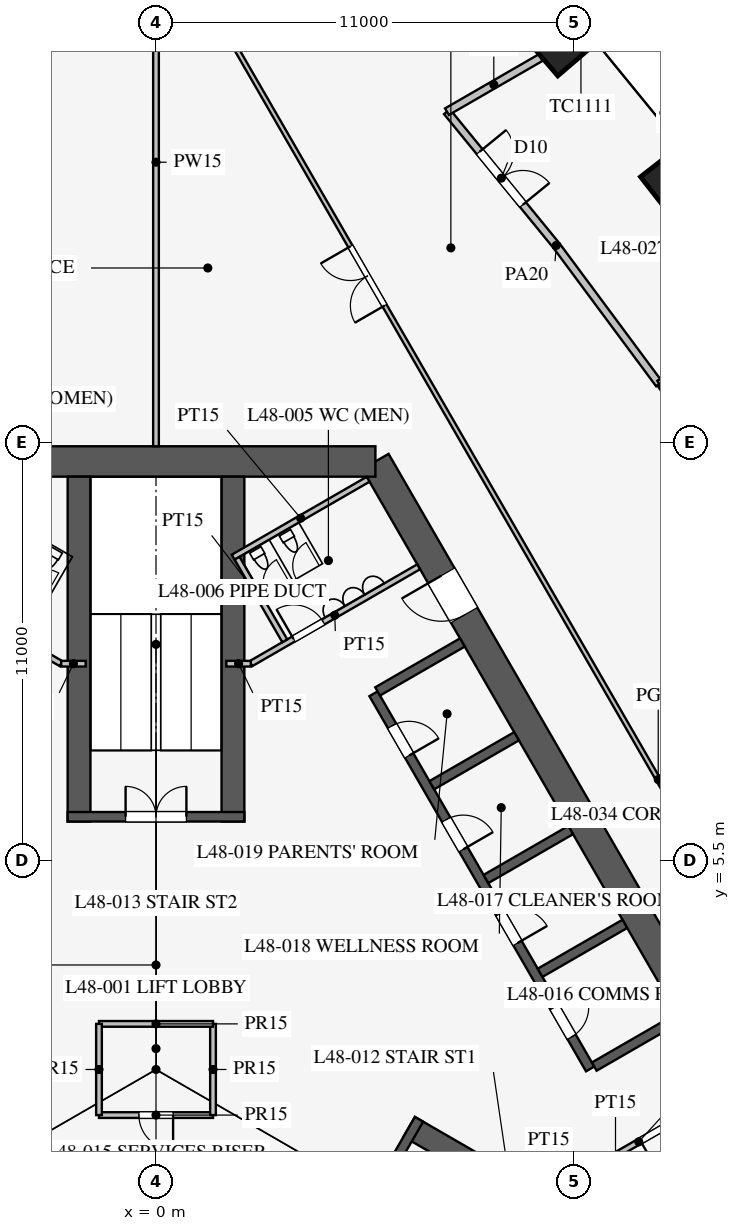
"""IFC4 building model, lengths in metres.
Left out: names, types, materials, properties, quantities, classifications, styles, units other than length and angle.
Written with IfcOpenShell. Run it as: python <this file> out.ifc"""

import sys

from ifc_helpers import new_model, si_unit, direction, frame, frame_2d, origin, origin_2d, place, context, subcontext, project, spatial, rectangle, extrude, element, fill, save


model = new_model("IFC4")
c1 = context("Model", 3, precision=1e-05, world=origin(), true_north=direction((0.0, 1.0)))
c2 = subcontext(c1, "Body", "Model", "MODEL_VIEW")
j1 = project(units=[si_unit("LENGTHUNIT", "METRE"), si_unit("PLANEANGLEUNIT", "RADIAN")], contexts=[c1])
p1 = place(None, origin())
s1 = spatial("IfcSite", under=j1, at=p1, CompositionType="ELEMENT")
p2 = place(p1, origin())
s2 = spatial("IfcBuilding", under=s1, at=p2, CompositionType="ELEMENT")
p3 = place(p2, frame((0.0, 0.0, 210.7)))
s3 = spatial("IfcBuildingStorey", under=s2, at=p3, CompositionType="ELEMENT", Elevation=210.7)
for number, where, z_axis, x_axis in (
    (1, (13.522, 23.396, 0.0), (0.0, 0.0, 1.0), (-0.615, 0.789, 0.0)),
    (2, (10.632, 26.923, 0.0), (0.0, 0.0, 1.0), (-0.651, 0.759, 0.0)),
):
    element("IfcColumn", number, at=place(p3, frame(where, z_axis=z_axis, x_axis=x_axis)), inside=s3, PredefinedType="COLUMN", context=c2, shape_type="SweptSolid", body=[
        extrude(rectangle(XDim=1.1, YDim=1.1, at=origin_2d()), origin(), (0.0, 0.0, 1.0), 4.2),
    ])
p4 = place(p3, frame((16.743, -3.0, 0.0), z_axis=(0.0, 0.0, 1.0), x_axis=(-0.500002442456, 0.866023993627, 0.0)))
e3 = element("IfcWall", 3, at=p4, inside=s3, PredefinedType="SHEAR", context=c2, shape_type="SweptSolid", body=[
    extrude(rectangle(XDim=21.939, YDim=0.8, at=frame_2d((10.97, 0.0))), origin(), (0.0, 0.0, 1.0), 4.2),
])
p5 = place(p4, frame((17.27, 0.0, 0.0)))
e4 = element("IfcOpeningElement", 4, at=p5, cuts=e3, PredefinedType="OPENING", context=c2, shape_type="SweptSolid", body=[
    extrude(rectangle(XDim=1.2, YDim=2.1, at=frame_2d((0.6, 1.05))), frame((0.0, 0.41, 0.0), z_axis=(0.0, -1.0, 0.0), x_axis=(1.0, 0.0, 0.0)), (0.0, 0.0, 1.0), 0.82),
])
p6 = place(p4, frame((3.47, 0.0, 0.0)))
e5 = element("IfcOpeningElement", 5, at=p6, cuts=e3, PredefinedType="OPENING", context=c2, shape_type="SweptSolid", body=[
    extrude(rectangle(XDim=1.2, YDim=2.1, at=frame_2d((0.6, 1.05))), frame((0.0, 0.41, 0.0), z_axis=(0.0, -1.0, 0.0), x_axis=(1.0, 0.0, 0.0)), (0.0, 0.0, 1.0), 0.82),
])
p7 = place(p3, frame((5.773, 16.0, 0.0), z_axis=(0.0, 0.0, 1.0), x_axis=(-1.0, 0.0, 0.0)))
e6 = element("IfcWall", 6, at=p7, inside=s3, PredefinedType="SHEAR", context=c2, shape_type="SweptSolid", body=[
    extrude(rectangle(XDim=11.547, YDim=0.8, at=frame_2d((5.773, 0.0))), origin(), (0.0, 0.0, 1.0), 4.2),
])
p8 = place(p3, frame((11.424, 0.014, 0.0), z_axis=(0.0, 0.0, 1.0), x_axis=(-0.500001763848, 0.866024385424, 0.0)))
e7 = element("IfcWall", 7, at=p8, inside=s3, PredefinedType="SHEAR", context=c2, shape_type="SweptSolid", body=[
    extrude(rectangle(XDim=11.4, YDim=0.25, at=frame_2d((5.7, 0.0))), origin(), (0.0, 0.0, 1.0), 4.2),
])
p9 = place(p8, frame((0.975, 0.0, 0.0)))
e8 = element("IfcOpeningElement", 8, at=p9, cuts=e7, PredefinedType="OPENING", context=c2, shape_type="SweptSolid", body=[
    extrude(rectangle(XDim=0.9, YDim=2.1, at=frame_2d((0.45, 1.05))), frame((0.0, 0.135, 0.0), z_axis=(0.0, -1.0, 0.0), x_axis=(1.0, 0.0, 0.0)), (0.0, 0.0, 1.0), 0.27),
])
p10 = place(p8, frame((3.825, 0.0, 0.0)))
e9 = element("IfcOpeningElement", 9, at=p10, cuts=e7, PredefinedType="OPENING", context=c2, shape_type="SweptSolid", body=[
    extrude(rectangle(XDim=0.9, YDim=2.1, at=frame_2d((0.45, 1.05))), frame((0.0, 0.135, 0.0), z_axis=(0.0, -1.0, 0.0), x_axis=(1.0, 0.0, 0.0)), (0.0, 0.0, 1.0), 0.27),
])
p11 = place(p8, frame((6.675, 0.0, 0.0)))
e10 = element("IfcOpeningElement", 10, at=p11, cuts=e7, PredefinedType="OPENING", context=c2, shape_type="SweptSolid", body=[
    extrude(rectangle(XDim=0.9, YDim=2.1, at=frame_2d((0.45, 1.05))), frame((0.0, 0.135, 0.0), z_axis=(0.0, -1.0, 0.0), x_axis=(1.0, 0.0, 0.0)), (0.0, 0.0, 1.0), 0.27),
])
p12 = place(p8, frame((9.525, 0.0, 0.0)))
e11 = element("IfcOpeningElement", 11, at=p12, cuts=e7, PredefinedType="OPENING", context=c2, shape_type="SweptSolid", body=[
    extrude(rectangle(XDim=0.9, YDim=2.1, at=frame_2d((0.45, 1.05))), frame((0.0, 0.135, 0.0), z_axis=(0.0, -1.0, 0.0), x_axis=(1.0, 0.0, 0.0)), (0.0, 0.0, 1.0), 0.27),
])
for number, where, z_axis, x_axis in (
    (12, (11.532, 0.076, 0.0), (0.0, 0.0, 1.0), (0.866, 0.5, 0.0)),
    (13, (10.107, 2.544, 0.0), (0.0, 0.0, 1.0), (0.866, 0.5, 0.0)),
    (14, (8.682, 5.012, 0.0), (0.0, 0.0, 1.0), (0.866, 0.5, 0.0)),
    (15, (7.257, 7.481, 0.0), (0.0, 0.0, 1.0), (0.866, 0.5, 0.0)),
):
    element("IfcWall", number, at=place(p3, frame(where, z_axis=z_axis, x_axis=x_axis)), inside=s3, PredefinedType="SHEAR", context=c2, shape_type="SweptSolid", body=[
        extrude(rectangle(XDim=2.575, YDim=0.25, at=frame_2d((1.288, 0.0))), origin(), (0.0, 0.0, 1.0), 4.2),
    ])
p13 = place(p3, frame((5.832, 9.949, 0.0), z_axis=(0.0, 0.0, 1.0), x_axis=(0.866029291668, 0.499993265928, 0.0)))
e16 = element("IfcWall", 16, at=p13, inside=s3, PredefinedType="SHEAR", context=c2, shape_type="SweptSolid", body=[
    extrude(rectangle(XDim=2.575, YDim=0.25, at=frame_2d((1.288, 0.0))), origin(), (0.0, 0.0, 1.0), 4.2),
])
p14 = place(p3, frame((6.663, -1.509, 0.0), z_axis=(0.0, 0.0, 1.0), x_axis=(0.866019375473, -0.500010441196, 0.0)))
e17 = element("IfcWall", 17, at=p14, inside=s3, PredefinedType="SHEAR", context=c2, shape_type="SweptSolid", body=[
    extrude(rectangle(XDim=9.075, YDim=0.6, at=frame_2d((4.538, 0.0))), origin(), (0.0, 0.0, 1.0), 4.2),
])
p15 = place(p3, frame((4.597, -5.339, 0.0), z_axis=(0.0, 0.0, 1.0), x_axis=(0.499984536904, 0.866034331223, 0.0)))
e18 = element("IfcWall", 18, at=p15, inside=s3, PredefinedType="SHEAR", context=c2, shape_type="SweptSolid", body=[
    extrude(rectangle(XDim=4.65, YDim=0.25, at=frame_2d((2.325, 0.0))), origin(), (0.0, 0.0, 1.0), 4.2),
])
p16 = place(p15, frame((1.525, 0.0, 0.0)))
e19 = element("IfcOpeningElement", 19, at=p16, cuts=e18, PredefinedType="OPENING", context=c2, shape_type="SweptSolid", body=[
    extrude(rectangle(XDim=1.6, YDim=2.1, at=frame_2d((0.8, 1.05))), frame((0.0, 0.135, 0.0), z_axis=(0.0, -1.0, 0.0), x_axis=(1.0, 0.0, 0.0)), (0.0, 0.0, 1.0), 0.27),
])
for number, where, z_axis, x_axis in (
    (20, (2.025, 6.525, 0.0), (0.0, 0.0, 1.0), (0.0, 1.0, 0.0)),
    (21, (-2.025, 6.525, 0.0), (0.0, 0.0, 1.0), (0.0, 1.0, 0.0)),
):
    element("IfcWall", number, at=place(p3, frame(where, z_axis=z_axis, x_axis=x_axis)), inside=s3, PredefinedType="SHEAR", context=c2, shape_type="SweptSolid", body=[
        extrude(rectangle(XDim=9.075, YDim=0.6, at=frame_2d((4.538, 0.0))), origin(), (0.0, 0.0, 1.0), 4.2),
    ])
p17 = place(p3, frame((2.325, 6.65, 0.0), z_axis=(0.0, 0.0, 1.0), x_axis=(-1.0, 0.0, 0.0)))
e22 = element("IfcWall", 22, at=p17, inside=s3, PredefinedType="SHEAR", context=c2, shape_type="SweptSolid", body=[
    extrude(rectangle(XDim=4.65, YDim=0.25, at=frame_2d((2.325, 0.0))), origin(), (0.0, 0.0, 1.0), 4.2),
])
p18 = place(p17, frame((1.525, 0.0, 0.0)))
e23 = element("IfcOpeningElement", 23, at=p18, cuts=e22, PredefinedType="OPENING", context=c2, shape_type="SweptSolid", body=[
    extrude(rectangle(XDim=1.6, YDim=2.1, at=frame_2d((0.8, 1.05))), frame((0.0, 0.135, 0.0), z_axis=(0.0, -1.0, 0.0), x_axis=(1.0, 0.0, 0.0)), (0.0, 0.0, 1.0), 0.27),
])
p19 = place(p3, frame((2.495, 10.678, 0.0), z_axis=(0.0, 0.0, 1.0), x_axis=(0.86602216432, 0.500005610874, 0.0)))
e24 = element("IfcWall", 24, at=p19, inside=s3, PredefinedType="PARTITIONING", context=c2, shape_type="SweptSolid", body=[
    extrude(rectangle(XDim=5.1, YDim=0.15, at=frame_2d((2.55, 0.0))), origin(), (0.0, 0.0, 1.0), 4.0),
])
p20 = place(p19, frame((1.3, 0.0, 0.0)))
e25 = element("IfcOpeningElement", 25, at=p20, cuts=e24, PredefinedType="OPENING", context=c2, shape_type="SweptSolid", body=[
    extrude(rectangle(XDim=0.9, YDim=2.1, at=frame_2d((0.45, 1.05))), frame((0.0, 0.085, 0.0), z_axis=(0.0, -1.0, 0.0), x_axis=(1.0, 0.0, 0.0)), (0.0, 0.0, 1.0), 0.17),
])
p21 = place(p3, frame((10.495, -3.178, 0.0), z_axis=(0.0, 0.0, 1.0), x_axis=(0.86602216432, 0.500005610874, 0.0)))
e26 = element("IfcWall", 26, at=p21, inside=s3, PredefinedType="PARTITIONING", context=c2, shape_type="SweptSolid", body=[
    extrude(rectangle(XDim=5.1, YDim=0.15, at=frame_2d((2.55, 0.0))), origin(), (0.0, 0.0, 1.0), 4.0),
])
p22 = place(p21, frame((2.6, 0.0, 0.0)))
e27 = element("IfcOpeningElement", 27, at=p22, cuts=e26, PredefinedType="OPENING", context=c2, shape_type="SweptSolid", body=[
    extrude(rectangle(XDim=0.9, YDim=2.1, at=frame_2d((0.45, 1.05))), frame((0.0, 0.085, 0.0), z_axis=(0.0, -1.0, 0.0), x_axis=(1.0, 0.0, 0.0)), (0.0, 0.0, 1.0), 0.17),
])
p23 = place(p3, frame((-2.495, 10.678, 0.0), z_axis=(0.0, 0.0, 1.0), x_axis=(-0.86602216432, 0.500005610874, 0.0)))
e28 = element("IfcWall", 28, at=p23, inside=s3, PredefinedType="PARTITIONING", context=c2, shape_type="SweptSolid", body=[
    extrude(rectangle(XDim=5.1, YDim=0.15, at=frame_2d((2.55, 0.0))), origin(), (0.0, 0.0, 1.0), 4.0),
])
p24 = place(p23, frame((2.6, 0.0, 0.0)))
e29 = element("IfcOpeningElement", 29, at=p24, cuts=e28, PredefinedType="OPENING", context=c2, shape_type="SweptSolid", body=[
    extrude(rectangle(XDim=0.9, YDim=2.1, at=frame_2d((0.45, 1.05))), frame((0.0, 0.085, 0.0), z_axis=(0.0, -1.0, 0.0), x_axis=(1.0, 0.0, 0.0)), (0.0, 0.0, 1.0), 0.17),
])
for number, where, z_axis, x_axis in (
    (30, (2.495, 10.678, 0.0), (0.0, 0.0, 1.0), (-1.0, 0.0, 0.0)),
    (31, (-2.495, 10.678, 0.0), (0.0, 0.0, 1.0), (1.0, 0.0, 0.0)),
):
    element("IfcWall", number, at=place(p3, frame(where, z_axis=z_axis, x_axis=x_axis)), inside=s3, PredefinedType="PARTITIONING", context=c2, shape_type="SweptSolid", body=[
        extrude(rectangle(XDim=0.645, YDim=0.15, at=frame_2d((0.323, 0.0))), origin(), (0.0, 0.0, 1.0), 4.0),
    ])
p25 = place(p3, frame((2.031, 13.482, 0.0), z_axis=(0.0, 0.0, 1.0), x_axis=(0.866050731258, 0.499956128963, 0.0)))
e32 = element("IfcWall", 32, at=p25, inside=s3, PredefinedType="PARTITIONING", context=c2, shape_type="SweptSolid", body=[
    extrude(rectangle(XDim=4.1, YDim=0.15, at=frame_2d((2.05, 0.0))), origin(), (0.0, 0.0, 1.0), 4.0),
])
p26 = place(p3, frame((3.389, 11.281, 0.0), z_axis=(0.0, 0.0, 1.0), x_axis=(-0.499989096993, 0.866031698547, 0.0)))
e33 = element("IfcWall", 33, at=p26, inside=s3, PredefinedType="PARTITIONING", context=c2, shape_type="SweptSolid", body=[
    extrude(rectangle(XDim=2.51, YDim=0.15, at=frame_2d((1.255, 0.0))), origin(), (0.0, 0.0, 1.0), 4.0),
])
p27 = place(p3, frame((-1.5, -1.2, 0.0), z_axis=(0.0, 0.0, 1.0), x_axis=(1.0, 0.0, 0.0)))
e34 = element("IfcWall", 34, at=p27, inside=s3, PredefinedType="PARTITIONING", context=c2, shape_type="SweptSolid", body=[
    extrude(rectangle(XDim=3.0, YDim=0.15, at=frame_2d((1.5, 0.0))), origin(), (0.0, 0.0, 1.0), 4.0),
])
p28 = place(p27, frame((1.05, 0.0, 0.0)))
e35 = element("IfcOpeningElement", 35, at=p28, cuts=e34, PredefinedType="OPENING", context=c2, shape_type="SweptSolid", body=[
    extrude(rectangle(XDim=0.9, YDim=2.1, at=frame_2d((0.45, 1.05))), frame((0.0, 0.085, 0.0), z_axis=(0.0, -1.0, 0.0), x_axis=(1.0, 0.0, 0.0)), (0.0, 0.0, 1.0), 0.17),
])
p29 = place(p3, frame((1.5, -1.2, 0.0), z_axis=(0.0, 0.0, 1.0), x_axis=(0.0, 1.0, 0.0)))
e36 = element("IfcWall", 36, at=p29, inside=s3, PredefinedType="PARTITIONING", context=c2, shape_type="SweptSolid", body=[
    extrude(rectangle(XDim=2.4, YDim=0.15, at=frame_2d((1.2, 0.0))), origin(), (0.0, 0.0, 1.0), 4.0),
])
p30 = place(p3, frame((1.5, 1.2, 0.0), z_axis=(0.0, 0.0, 1.0), x_axis=(-1.0, 0.0, 0.0)))
e37 = element("IfcWall", 37, at=p30, inside=s3, PredefinedType="PARTITIONING", context=c2, shape_type="SweptSolid", body=[
    extrude(rectangle(XDim=3.0, YDim=0.15, at=frame_2d((1.5, 0.0))), origin(), (0.0, 0.0, 1.0), 4.0),
])
p31 = place(p3, frame((-1.5, 1.2, 0.0), z_axis=(0.0, 0.0, 1.0), x_axis=(0.0, -1.0, 0.0)))
e38 = element("IfcWall", 38, at=p31, inside=s3, PredefinedType="PARTITIONING", context=c2, shape_type="SweptSolid", body=[
    extrude(rectangle(XDim=2.4, YDim=0.15, at=frame_2d((1.2, 0.0))), origin(), (0.0, 0.0, 1.0), 4.0),
])
p32 = place(p3, frame((0.0, 16.4, 0.0), z_axis=(0.0, 0.0, 1.0), x_axis=(0.0, 1.0, 0.0)))
e39 = element("IfcWall", 39, at=p32, inside=s3, PredefinedType="PARTITIONING", context=c2, shape_type="SweptSolid", body=[
    extrude(rectangle(XDim=14.95, YDim=0.15, at=frame_2d((7.475, 0.0))), origin(), (0.0, 0.0, 1.0), 2.4),
])
p33 = place(p3, frame((13.268, 7.66, 0.0), z_axis=(0.0, 0.0, 1.0), x_axis=(0.866021046153, 0.500007547564, 0.0)))
e40 = element("IfcWall", 40, at=p33, inside=s3, PredefinedType="PARTITIONING", context=c2, shape_type="SweptSolid", body=[
    extrude(rectangle(XDim=8.45, YDim=0.15, at=frame_2d((4.225, 0.0))), origin(), (0.0, 0.0, 1.0), 3.3),
])
p34 = place(p3, frame((26.415, -15.231, 0.0), z_axis=(0.0, 0.0, 1.0), x_axis=(-0.50000091641, 0.866024874695, 0.0)))
e41 = element("IfcWall", 41, at=p34, inside=s3, PredefinedType="PARTITIONING", context=c2, shape_type="SweptSolid", body=[
    extrude(rectangle(XDim=52.796, YDim=0.12, at=frame_2d((26.398, 0.0))), origin(), (0.0, 0.0, 1.0), 2.9),
])
p35 = place(p34, frame((10.2, 0.0, 0.15)))
e42 = element("IfcOpeningElement", 42, at=p35, cuts=e41, PredefinedType="OPENING", context=c2, shape_type="SweptSolid", body=[
    extrude(rectangle(XDim=1.8, YDim=2.1, at=frame_2d((0.9, 1.05))), frame((0.0, 0.07, 0.0), z_axis=(0.0, -1.0, 0.0), x_axis=(1.0, 0.0, 0.0)), (0.0, 0.0, 1.0), 0.14),
])
p36 = place(p34, frame((40.8, 0.0, 0.15)))
e43 = element("IfcOpeningElement", 43, at=p36, cuts=e41, PredefinedType="OPENING", context=c2, shape_type="SweptSolid", body=[
    extrude(rectangle(XDim=1.8, YDim=2.1, at=frame_2d((0.9, 1.05))), frame((0.0, 0.07, 0.0), z_axis=(0.0, -1.0, 0.0), x_axis=(1.0, 0.0, 0.0)), (0.0, 0.0, 1.0), 0.14),
])
p37 = place(p3, frame((10.541, 21.674, 0.0), z_axis=(0.0, 0.0, 1.0), x_axis=(-0.632733183181, 0.774369885069, 0.0)))
e44 = element("IfcWall", 44, at=p37, inside=s3, PredefinedType="PARTITIONING", context=c2, shape_type="SweptSolid", body=[
    extrude(rectangle(XDim=4.559, YDim=0.2, at=frame_2d((2.28, 0.0))), origin(), (0.0, 0.0, 1.0), 2.9),
])
p38 = place(p37, frame((1.4, 0.0, 0.15)))
e45 = element("IfcOpeningElement", 45, at=p38, cuts=e44, PredefinedType="OPENING", context=c2, shape_type="SweptSolid", body=[
    extrude(rectangle(XDim=1.8, YDim=2.1, at=frame_2d((0.9, 1.05))), frame((0.0, 0.11, 0.0), z_axis=(0.0, -1.0, 0.0), x_axis=(1.0, 0.0, 0.0)), (0.0, 0.0, 1.0), 0.22),
])
p39 = place(p3, frame((15.761, 14.296, 0.0), z_axis=(0.0, 0.0, 1.0), x_axis=(-0.55850386778, 0.829501916619, 0.0)))
e46 = element("IfcWall", 46, at=p39, inside=s3, PredefinedType="PARTITIONING", context=c2, shape_type="SweptSolid", body=[
    extrude(rectangle(XDim=4.511, YDim=0.12, at=frame_2d((2.255, 0.0))), origin(), (0.0, 0.0, 1.0), 2.9),
])
p40 = place(p39, frame((1.8, 0.0, 0.15)))
e47 = element("IfcOpeningElement", 47, at=p40, cuts=e46, PredefinedType="OPENING", context=c2, shape_type="SweptSolid", body=[
    extrude(rectangle(XDim=0.9, YDim=2.1, at=frame_2d((0.45, 1.05))), frame((0.0, 0.07, 0.0), z_axis=(0.0, -1.0, 0.0), x_axis=(1.0, 0.0, 0.0)), (0.0, 0.0, 1.0), 0.14),
])
p41 = place(p3, frame((13.242, 18.037, 0.0), z_axis=(0.0, 0.0, 1.0), x_axis=(-0.596173167565, 0.802855873912, 0.0)))
e48 = element("IfcWall", 48, at=p41, inside=s3, PredefinedType="PARTITIONING", context=c2, shape_type="SweptSolid", body=[
    extrude(rectangle(XDim=4.53, YDim=0.2, at=frame_2d((2.265, 0.0))), origin(), (0.0, 0.0, 1.0), 2.9),
])
p42 = place(p3, frame((7.656, 25.205, 0.0), z_axis=(0.0, 0.0, 1.0), x_axis=(0.866022741256, 0.500004611607, 0.0)))
e49 = element("IfcWall", 49, at=p42, inside=s3, PredefinedType="PARTITIONING", context=c2, shape_type="SweptSolid", body=[
    extrude(rectangle(XDim=2.846, YDim=0.2, at=frame_2d((1.423, 0.0))), origin(), (0.0, 0.0, 1.0), 2.9),
])
p43 = place(p3, frame((13.242, 18.037, 0.0), z_axis=(0.0, 0.0, 1.0), x_axis=(0.866020927947, 0.500007752297, 0.0)))
e50 = element("IfcWall", 50, at=p43, inside=s3, PredefinedType="PARTITIONING", context=c2, shape_type="SweptSolid", body=[
    extrude(rectangle(XDim=2.864, YDim=0.2, at=frame_2d((1.432, 0.0))), origin(), (0.0, 0.0, 1.0), 2.9),
])
p44 = place(p20, origin())
e51 = element("IfcDoor", 51, at=p44, inside=s3, OperationType="SINGLE_SWING_LEFT", PredefinedType="DOOR", context=c2, shape_type="SweptSolid", body=[
    extrude(rectangle(XDim=0.9, YDim=2.1, at=frame_2d((0.45, 1.05))), frame((0.0, 0.025, 0.0), z_axis=(0.0, -1.0, 0.0), x_axis=(1.0, 0.0, 0.0)), (0.0, 0.0, 1.0), 0.05),
])
fill(e25, e51)
p45 = place(p22, frame((0.9, 0.0, 0.0), z_axis=(0.0, 0.0, 1.0), x_axis=(-1.0, 0.0, 0.0)))
e52 = element("IfcDoor", 52, at=p45, inside=s3, OperationType="SINGLE_SWING_RIGHT", PredefinedType="DOOR", context=c2, shape_type="SweptSolid", body=[
    extrude(rectangle(XDim=0.9, YDim=2.1, at=frame_2d((0.45, 1.05))), frame((0.0, 0.025, 0.0), z_axis=(0.0, -1.0, 0.0), x_axis=(1.0, 0.0, 0.0)), (0.0, 0.0, 1.0), 0.05),
])
fill(e27, e52)
p46 = place(p28, frame((0.9, 0.0, 0.0), z_axis=(0.0, 0.0, 1.0), x_axis=(-1.0, 0.0, 0.0)))
e53 = element("IfcDoor", 53, at=p46, inside=s3, OperationType="SINGLE_SWING_LEFT", PredefinedType="DOOR", context=c2, shape_type="SweptSolid", body=[
    extrude(rectangle(XDim=0.9, YDim=2.1, at=frame_2d((0.45, 1.05))), frame((0.0, 0.025, 0.0), z_axis=(0.0, -1.0, 0.0), x_axis=(1.0, 0.0, 0.0)), (0.0, 0.0, 1.0), 0.05),
])
fill(e35, e53)
p47 = place(p18, frame((1.6, 0.0, 0.0), z_axis=(0.0, 0.0, 1.0), x_axis=(-1.0, 0.0, 0.0)))
e54 = element("IfcDoor", 54, at=p47, inside=s3, OperationType="DOUBLE_DOOR_SINGLE_SWING", PredefinedType="DOOR", context=c2, shape_type="SweptSolid", body=[
    extrude(rectangle(XDim=1.6, YDim=2.1, at=frame_2d((0.8, 1.05))), frame((0.0, 0.025, 0.0), z_axis=(0.0, -1.0, 0.0), x_axis=(1.0, 0.0, 0.0)), (0.0, 0.0, 1.0), 0.05),
])
fill(e23, e54)
p48 = place(p5, origin())
e55 = element("IfcDoor", 55, at=p48, inside=s3, OperationType="SINGLE_SWING_RIGHT", PredefinedType="DOOR", context=c2, shape_type="SweptSolid", body=[
    extrude(rectangle(XDim=1.2, YDim=2.1, at=frame_2d((0.6, 1.05))), frame((0.0, 0.025, 0.0), z_axis=(0.0, -1.0, 0.0), x_axis=(1.0, 0.0, 0.0)), (0.0, 0.0, 1.0), 0.05),
])
fill(e4, e55)
p49 = place(p9, frame((0.9, 0.0, 0.0), z_axis=(0.0, 0.0, 1.0), x_axis=(-1.0, 0.0, 0.0)))
e56 = element("IfcDoor", 56, at=p49, inside=s3, OperationType="SINGLE_SWING_LEFT", PredefinedType="DOOR", context=c2, shape_type="SweptSolid", body=[
    extrude(rectangle(XDim=0.9, YDim=2.1, at=frame_2d((0.45, 1.05))), frame((0.0, 0.025, 0.0), z_axis=(0.0, -1.0, 0.0), x_axis=(1.0, 0.0, 0.0)), (0.0, 0.0, 1.0), 0.05),
])
fill(e8, e56)
p50 = place(p10, frame((0.9, 0.0, 0.0), z_axis=(0.0, 0.0, 1.0), x_axis=(-1.0, 0.0, 0.0)))
e57 = element("IfcDoor", 57, at=p50, inside=s3, OperationType="SINGLE_SWING_RIGHT", PredefinedType="DOOR", context=c2, shape_type="SweptSolid", body=[
    extrude(rectangle(XDim=0.9, YDim=2.1, at=frame_2d((0.45, 1.05))), frame((0.0, 0.025, 0.0), z_axis=(0.0, -1.0, 0.0), x_axis=(1.0, 0.0, 0.0)), (0.0, 0.0, 1.0), 0.05),
])
fill(e9, e57)
p51 = place(p11, frame((0.9, 0.0, 0.0), z_axis=(0.0, 0.0, 1.0), x_axis=(-1.0, 0.0, 0.0)))
e58 = element("IfcDoor", 58, at=p51, inside=s3, OperationType="SINGLE_SWING_RIGHT", PredefinedType="DOOR", context=c2, shape_type="SweptSolid", body=[
    extrude(rectangle(XDim=0.9, YDim=2.1, at=frame_2d((0.45, 1.05))), frame((0.0, 0.025, 0.0), z_axis=(0.0, -1.0, 0.0), x_axis=(1.0, 0.0, 0.0)), (0.0, 0.0, 1.0), 0.05),
])
fill(e10, e58)
p52 = place(p12, frame((0.9, 0.0, 0.0), z_axis=(0.0, 0.0, 1.0), x_axis=(-1.0, 0.0, 0.0)))
e59 = element("IfcDoor", 59, at=p52, inside=s3, OperationType="SINGLE_SWING_RIGHT", PredefinedType="DOOR", context=c2, shape_type="SweptSolid", body=[
    extrude(rectangle(XDim=0.9, YDim=2.1, at=frame_2d((0.45, 1.05))), frame((0.0, 0.025, 0.0), z_axis=(0.0, -1.0, 0.0), x_axis=(1.0, 0.0, 0.0)), (0.0, 0.0, 1.0), 0.05),
])
fill(e11, e59)
p53 = place(p38, frame((1.8, 0.0, 0.0), z_axis=(0.0, 0.0, 1.0), x_axis=(-1.0, 0.0, 0.0)))
e60 = element("IfcDoor", 60, at=p53, inside=s3, OperationType="DOUBLE_DOOR_SINGLE_SWING", PredefinedType="DOOR", context=c2, shape_type="SweptSolid", body=[
    extrude(rectangle(XDim=1.8, YDim=2.1, at=frame_2d((0.9, 1.05))), frame((0.0, 0.025, 0.0), z_axis=(0.0, -1.0, 0.0), x_axis=(1.0, 0.0, 0.0)), (0.0, 0.0, 1.0), 0.05),
])
fill(e45, e60)
p54 = place(p36, origin())
e61 = element("IfcDoor", 61, at=p54, inside=s3, OperationType="DOUBLE_DOOR_SINGLE_SWING", PredefinedType="DOOR", context=c2, shape_type="SweptSolid", body=[
    extrude(rectangle(XDim=1.8, YDim=2.1, at=frame_2d((0.9, 1.05))), frame((0.0, 0.025, 0.0), z_axis=(0.0, -1.0, 0.0), x_axis=(1.0, 0.0, 0.0)), (0.0, 0.0, 1.0), 0.05),
])
fill(e43, e61)
save(model, sys.argv[1])
